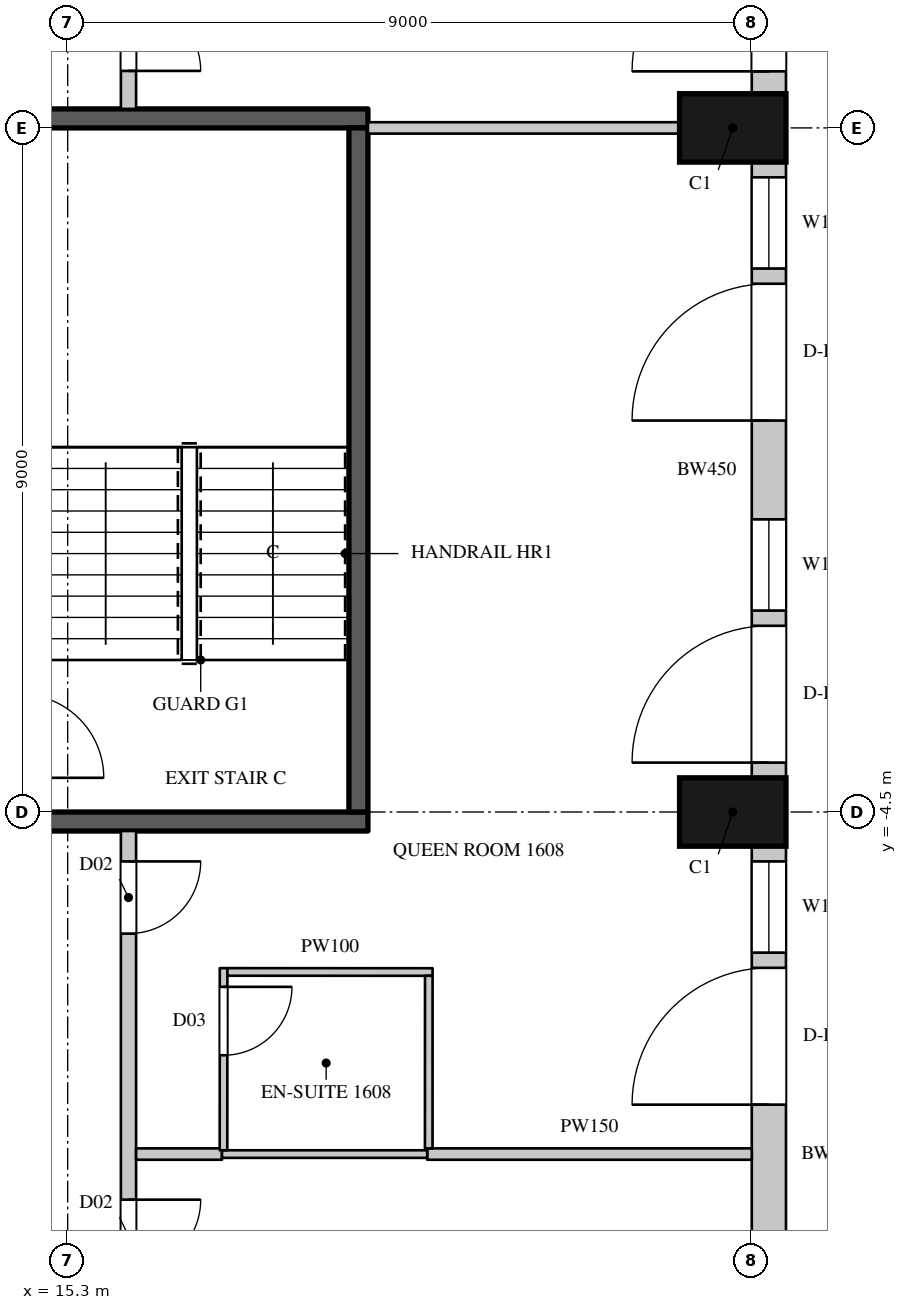
"""IFC4 building model, lengths in metres.
Left out: names, types, materials, properties, quantities, classifications, styles, units other than length and angle.
Written with IfcOpenShell. Run it as: python <this file> out.ifc"""

import sys

from ifc_helpers import new_model, si_unit, direction, frame, frame_2d, origin, origin_2d, place, context, subcontext, project, spatial, rectangle, extrude, element, fill, save


model = new_model("IFC4")
c1 = context("Model", 3, precision=1e-05, world=origin(), true_north=direction((0.0, 1.0)))
c2 = subcontext(c1, "Body", "Model", "MODEL_VIEW")
j1 = project(units=[si_unit("LENGTHUNIT", "METRE"), si_unit("PLANEANGLEUNIT", "RADIAN")], contexts=[c1])
p1 = place(None, origin())
s1 = spatial("IfcSite", under=j1, at=p1, CompositionType="ELEMENT")
p2 = place(p1, origin())
s2 = spatial("IfcBuilding", under=s1, at=p2, CompositionType="ELEMENT")
p3 = place(p2, frame((0.0, 0.0, 87.9)))
s3 = spatial("IfcBuildingStorey", under=s2, at=p3, CompositionType="ELEMENT", Elevation=87.9)
for number, where, z_axis, x_axis in (
    (1, (24.05, -4.5, 0.0), (0.0, 0.0, 1.0), (0.0, 1.0, 0.0)),
    (2, (24.05, 4.5, 0.0), (0.0, 0.0, 1.0), (0.0, 1.0, 0.0)),
):
    element("IfcColumn", number, at=place(p3, frame(where, z_axis=z_axis, x_axis=x_axis)), inside=s3, PredefinedType="COLUMN", context=c2, shape_type="SweptSolid", body=[
        extrude(rectangle(XDim=0.9, YDim=1.4, at=origin_2d()), origin(), (0.0, 0.0, 1.0), 3.6),
    ])
p4 = place(p3, frame((24.525, -13.05, 0.0), z_axis=(0.0, 0.0, 1.0), x_axis=(0.0, 1.0, 0.0)))
e3 = element("IfcWall", 3, at=p4, inside=s3, PredefinedType="SOLIDWALL", context=c2, shape_type="SweptSolid", body=[
    extrude(rectangle(XDim=8.1, YDim=0.45, at=frame_2d((4.05, 0.0))), origin(), (0.0, 0.0, 1.0), 3.3),
])
p5 = place(p4, frame((0.9, 0.0, 0.0)))
e4 = element("IfcOpeningElement", 4, at=p5, cuts=e3, PredefinedType="OPENING", context=c2, shape_type="SweptSolid", body=[
    extrude(rectangle(XDim=1.8, YDim=2.4, at=frame_2d((0.9, 1.2))), frame((0.0, 0.235, 0.0), z_axis=(0.0, -1.0, 0.0), x_axis=(1.0, 0.0, 0.0)), (0.0, 0.0, 1.0), 0.47),
])
p6 = place(p4, frame((4.7, 0.0, 0.0)))
e5 = element("IfcOpeningElement", 5, at=p6, cuts=e3, PredefinedType="OPENING", context=c2, shape_type="SweptSolid", body=[
    extrude(rectangle(XDim=1.8, YDim=2.4, at=frame_2d((0.9, 1.2))), frame((0.0, 0.235, 0.0), z_axis=(0.0, -1.0, 0.0), x_axis=(1.0, 0.0, 0.0)), (0.0, 0.0, 1.0), 0.47),
])
p7 = place(p4, frame((6.7, 0.0, 1.05)))
e6 = element("IfcOpeningElement", 6, at=p7, cuts=e3, PredefinedType="OPENING", context=c2, shape_type="SweptSolid", body=[
    extrude(rectangle(XDim=1.2, YDim=2.0, at=frame_2d((0.6, 1.0))), frame((0.0, 0.235, 0.0), z_axis=(0.0, -1.0, 0.0), x_axis=(1.0, 0.0, 0.0)), (0.0, 0.0, 1.0), 0.47),
])
p8 = place(p3, frame((24.525, -4.05, 0.0), z_axis=(0.0, 0.0, 1.0), x_axis=(0.0, 1.0, 0.0)))
e7 = element("IfcWall", 7, at=p8, inside=s3, PredefinedType="SOLIDWALL", context=c2, shape_type="SweptSolid", body=[
    extrude(rectangle(XDim=8.1, YDim=0.45, at=frame_2d((4.05, 0.0))), origin(), (0.0, 0.0, 1.0), 3.3),
])
p9 = place(p8, frame((0.2, 0.0, 0.0)))
e8 = element("IfcOpeningElement", 8, at=p9, cuts=e7, PredefinedType="OPENING", context=c2, shape_type="SweptSolid", body=[
    extrude(rectangle(XDim=1.8, YDim=2.4, at=frame_2d((0.9, 1.2))), frame((0.0, 0.235, 0.0), z_axis=(0.0, -1.0, 0.0), x_axis=(1.0, 0.0, 0.0)), (0.0, 0.0, 1.0), 0.47),
])
p10 = place(p8, frame((2.2, 0.0, 1.05)))
e9 = element("IfcOpeningElement", 9, at=p10, cuts=e7, PredefinedType="OPENING", context=c2, shape_type="SweptSolid", body=[
    extrude(rectangle(XDim=1.2, YDim=2.0, at=frame_2d((0.6, 1.0))), frame((0.0, 0.235, 0.0), z_axis=(0.0, -1.0, 0.0), x_axis=(1.0, 0.0, 0.0)), (0.0, 0.0, 1.0), 0.47),
])
p11 = place(p8, frame((4.7, 0.0, 0.0)))
e10 = element("IfcOpeningElement", 10, at=p11, cuts=e7, PredefinedType="OPENING", context=c2, shape_type="SweptSolid", body=[
    extrude(rectangle(XDim=1.8, YDim=2.4, at=frame_2d((0.9, 1.2))), frame((0.0, 0.235, 0.0), z_axis=(0.0, -1.0, 0.0), x_axis=(1.0, 0.0, 0.0)), (0.0, 0.0, 1.0), 0.47),
])
p12 = place(p8, frame((6.7, 0.0, 1.05)))
e11 = element("IfcOpeningElement", 11, at=p12, cuts=e7, PredefinedType="OPENING", context=c2, shape_type="SweptSolid", body=[
    extrude(rectangle(XDim=1.2, YDim=2.0, at=frame_2d((0.6, 1.0))), frame((0.0, 0.235, 0.0), z_axis=(0.0, -1.0, 0.0), x_axis=(1.0, 0.0, 0.0)), (0.0, 0.0, 1.0), 0.47),
])
p13 = place(p3, frame((24.525, 4.95, 0.0), z_axis=(0.0, 0.0, 1.0), x_axis=(0.0, 1.0, 0.0)))
e12 = element("IfcWall", 12, at=p13, inside=s3, PredefinedType="SOLIDWALL", context=c2, shape_type="SweptSolid", body=[
    extrude(rectangle(XDim=8.439, YDim=0.45, at=frame_2d((4.219, 0.0))), origin(), (0.0, 0.0, 1.0), 3.3),
])
p14 = place(p13, frame((0.294, 0.0, 0.0)))
e13 = element("IfcOpeningElement", 13, at=p14, cuts=e12, PredefinedType="OPENING", context=c2, shape_type="SweptSolid", body=[
    extrude(rectangle(XDim=1.8, YDim=2.4, at=frame_2d((0.9, 1.2))), frame((0.0, 0.235, 0.0), z_axis=(0.0, -1.0, 0.0), x_axis=(1.0, 0.0, 0.0)), (0.0, 0.0, 1.0), 0.47),
])
p15 = place(p13, frame((2.294, 0.0, 1.05)))
e14 = element("IfcOpeningElement", 14, at=p15, cuts=e12, PredefinedType="OPENING", context=c2, shape_type="SweptSolid", body=[
    extrude(rectangle(XDim=1.2, YDim=2.0, at=frame_2d((0.6, 1.0))), frame((0.0, 0.235, 0.0), z_axis=(0.0, -1.0, 0.0), x_axis=(1.0, 0.0, 0.0)), (0.0, 0.0, 1.0), 0.47),
])
p16 = place(p13, frame((5.232, 0.0, 1.05)))
e15 = element("IfcOpeningElement", 15, at=p16, cuts=e12, PredefinedType="OPENING", context=c2, shape_type="SweptSolid", body=[
    extrude(rectangle(XDim=2.7, YDim=2.0, at=frame_2d((1.35, 1.0))), frame((0.0, 0.235, 0.0), z_axis=(0.0, -1.0, 0.0), x_axis=(1.0, 0.0, 0.0)), (0.0, 0.0, 1.0), 0.47),
])
p17 = place(p3, frame((16.1, -17.5, 0.0), z_axis=(0.0, 0.0, 1.0), x_axis=(0.0, 1.0, 0.0)))
e16 = element("IfcWall", 16, at=p17, inside=s3, PredefinedType="PARTITIONING", context=c2, shape_type="SweptSolid", body=[
    extrude(rectangle(XDim=12.75, YDim=0.2, at=frame_2d((6.375, 0.0))), origin(), (0.0, 0.0, 1.0), 3.3),
])
p18 = place(p17, frame((2.75, 0.0, 0.0)))
e17 = element("IfcOpeningElement", 17, at=p18, cuts=e16, PredefinedType="OPENING", context=c2, shape_type="SweptSolid", body=[
    extrude(rectangle(XDim=0.95, YDim=2.2, at=frame_2d((0.475, 1.1))), frame((0.0, 0.11, 0.0), z_axis=(0.0, -1.0, 0.0), x_axis=(1.0, 0.0, 0.0)), (0.0, 0.0, 1.0), 0.22),
])
p19 = place(p17, frame((6.95, 0.0, 0.0)))
e18 = element("IfcOpeningElement", 18, at=p19, cuts=e16, PredefinedType="OPENING", context=c2, shape_type="SweptSolid", body=[
    extrude(rectangle(XDim=0.95, YDim=2.2, at=frame_2d((0.475, 1.1))), frame((0.0, 0.11, 0.0), z_axis=(0.0, -1.0, 0.0), x_axis=(1.0, 0.0, 0.0)), (0.0, 0.0, 1.0), 0.22),
])
p20 = place(p17, frame((11.4, 0.0, 0.0)))
e19 = element("IfcOpeningElement", 19, at=p20, cuts=e16, PredefinedType="OPENING", context=c2, shape_type="SweptSolid", body=[
    extrude(rectangle(XDim=0.95, YDim=2.2, at=frame_2d((0.475, 1.1))), frame((0.0, 0.11, 0.0), z_axis=(0.0, -1.0, 0.0), x_axis=(1.0, 0.0, 0.0)), (0.0, 0.0, 1.0), 0.22),
])
p21 = place(p3, frame((16.1, 4.75, 0.0), z_axis=(0.0, 0.0, 1.0), x_axis=(0.0, 1.0, 0.0)))
e20 = element("IfcWall", 20, at=p21, inside=s3, PredefinedType="PARTITIONING", context=c2, shape_type="SweptSolid", body=[
    extrude(rectangle(XDim=12.65, YDim=0.2, at=frame_2d((6.325, 0.0))), origin(), (0.0, 0.0, 1.0), 3.3),
])
p22 = place(p21, frame((0.5, 0.0, 0.0)))
e21 = element("IfcOpeningElement", 21, at=p22, cuts=e20, PredefinedType="OPENING", context=c2, shape_type="SweptSolid", body=[
    extrude(rectangle(XDim=0.95, YDim=2.2, at=frame_2d((0.475, 1.1))), frame((0.0, 0.11, 0.0), z_axis=(0.0, -1.0, 0.0), x_axis=(1.0, 0.0, 0.0)), (0.0, 0.0, 1.0), 0.22),
])
p23 = place(p21, frame((6.9, 0.0, 0.0)))
e22 = element("IfcOpeningElement", 22, at=p23, cuts=e20, PredefinedType="OPENING", context=c2, shape_type="SweptSolid", body=[
    extrude(rectangle(XDim=0.95, YDim=2.2, at=frame_2d((0.475, 1.1))), frame((0.0, 0.11, 0.0), z_axis=(0.0, -1.0, 0.0), x_axis=(1.0, 0.0, 0.0)), (0.0, 0.0, 1.0), 0.22),
])
p24 = place(p3, frame((16.2, -9.0, 0.0), z_axis=(0.0, 0.0, 1.0), x_axis=(1.0, 0.0, 0.0)))
e23 = element("IfcWall", 23, at=p24, inside=s3, PredefinedType="PARTITIONING", context=c2, shape_type="SweptSolid", body=[
    extrude(rectangle(XDim=1.13, YDim=0.15, at=frame_2d((0.565, 0.0))), origin(), (0.0, 0.0, 1.0), 2.65),
])
p25 = place(p3, frame((19.25, 4.5, 0.0), z_axis=(0.0, 0.0, 1.0), x_axis=(1.0, 0.0, 0.0)))
e24 = element("IfcWall", 24, at=p25, inside=s3, PredefinedType="PARTITIONING", context=c2, shape_type="SweptSolid", body=[
    extrude(rectangle(XDim=4.1, YDim=0.15, at=frame_2d((2.05, 0.0))), origin(), (0.0, 0.0, 1.0), 3.3),
])
p26 = place(p3, frame((20.03, -9.0, 0.0), z_axis=(0.0, 0.0, 1.0), x_axis=(1.0, 0.0, 0.0)))
e25 = element("IfcWall", 25, at=p26, inside=s3, PredefinedType="PARTITIONING", context=c2, shape_type="SweptSolid", body=[
    extrude(rectangle(XDim=4.27, YDim=0.15, at=frame_2d((2.135, 0.0))), origin(), (0.0, 0.0, 1.0), 2.65),
])
for number, where, z_axis, x_axis in (
    (26, (14.55, -4.625, 0.0), (0.0, 0.0, 1.0), (1.0, 0.0, 0.0)),
    (27, (14.55, 4.625, 0.0), (0.0, 0.0, 1.0), (1.0, 0.0, 0.0)),
):
    element("IfcWall", number, at=place(p3, frame(where, z_axis=z_axis, x_axis=x_axis)), inside=s3, PredefinedType="SHEAR", context=c2, shape_type="SweptSolid", body=[
        extrude(rectangle(XDim=4.7, YDim=0.25, at=frame_2d((2.35, 0.0))), origin(), (0.0, 0.0, 1.0), 3.3),
    ])
p27 = place(p3, frame((19.125, -4.5, 0.0), z_axis=(0.0, 0.0, 1.0), x_axis=(0.0, 1.0, 0.0)))
e28 = element("IfcWall", 28, at=p27, inside=s3, PredefinedType="SHEAR", context=c2, shape_type="SweptSolid", body=[
    extrude(rectangle(XDim=9.0, YDim=0.25, at=frame_2d((4.5, 0.0))), origin(), (0.0, 0.0, 1.0), 3.3),
])
p28 = place(p3, frame((17.33, -9.0, 0.0), z_axis=(0.0, 0.0, 1.0), x_axis=(1.0, 0.0, 0.0)))
e29 = element("IfcWall", 29, at=p28, inside=s3, PredefinedType="PARTITIONING", context=c2, shape_type="SweptSolid", body=[
    extrude(rectangle(XDim=2.7, YDim=0.1, at=frame_2d((1.35, 0.0))), origin(), (0.0, 0.0, 1.0), 2.65),
])
p29 = place(p3, frame((17.35, -8.95, 0.0), z_axis=(0.0, 0.0, 1.0), x_axis=(0.000407580973, 0.999999916939, 0.0)))
e30 = element("IfcWall", 30, at=p29, inside=s3, PredefinedType="PARTITIONING", context=c2, shape_type="SweptSolid", body=[
    extrude(rectangle(XDim=2.396, YDim=0.1, at=frame_2d((1.198, 0.0))), origin(), (0.0, 0.0, 1.0), 3.3),
])
p30 = place(p29, frame((1.25, 0.0, 0.0)))
e31 = element("IfcOpeningElement", 31, at=p30, cuts=e30, PredefinedType="OPENING", context=c2, shape_type="SweptSolid", body=[
    extrude(rectangle(XDim=0.9, YDim=2.2, at=frame_2d((0.45, 1.1))), frame((0.0, 0.06, 0.0), z_axis=(0.0, -1.0, 0.0), x_axis=(1.0, 0.0, 0.0)), (0.0, 0.0, 1.0), 0.12),
])
p31 = place(p3, frame((17.401, -6.604, 0.0), z_axis=(0.0, 0.0, 1.0), x_axis=(0.9999999346, -0.000361663629, 0.0)))
e32 = element("IfcWall", 32, at=p31, inside=s3, PredefinedType="PARTITIONING", context=c2, shape_type="SweptSolid", body=[
    extrude(rectangle(XDim=2.7, YDim=0.1, at=frame_2d((1.35, 0.0))), origin(), (0.0, 0.0, 1.0), 3.3),
])
p32 = place(p3, frame((20.05, -8.925, 0.0), z_axis=(0.0, 0.0, 1.0), x_axis=(0.000430200003, 0.999999907464, 0.0)))
e33 = element("IfcWall", 33, at=p32, inside=s3, PredefinedType="PARTITIONING", context=c2, shape_type="SweptSolid", body=[
    extrude(rectangle(XDim=2.27, YDim=0.1, at=frame_2d((1.135, 0.0))), origin(), (0.0, 0.0, 1.0), 3.3),
])
p33 = place(p6, origin())
e34 = element("IfcDoor", 34, at=p33, inside=s3, OperationType="SLIDING_TO_LEFT", PredefinedType="DOOR", context=c2, shape_type="SweptSolid", body=[
    extrude(rectangle(XDim=1.8, YDim=2.4, at=frame_2d((0.9, 1.2))), frame((0.0, 0.13, 0.0), z_axis=(0.0, -1.0, 0.0), x_axis=(1.0, 0.0, 0.0)), (0.0, 0.0, 1.0), 0.05),
])
fill(e5, e34)
p34 = place(p7, origin())
e35 = element("IfcWindow", 35, at=p34, inside=s3, PartitioningType="SINGLE_PANEL", PredefinedType="WINDOW", context=c2, shape_type="SweptSolid", body=[
    extrude(rectangle(XDim=1.2, YDim=2.0, at=frame_2d((0.6, 1.0))), frame((0.0, 0.135, 0.0), z_axis=(0.0, -1.0, 0.0), x_axis=(1.0, 0.0, 0.0)), (0.0, 0.0, 1.0), 0.06),
])
fill(e6, e35)
p35 = place(p9, origin())
e36 = element("IfcDoor", 36, at=p35, inside=s3, OperationType="SLIDING_TO_LEFT", PredefinedType="DOOR", context=c2, shape_type="SweptSolid", body=[
    extrude(rectangle(XDim=1.8, YDim=2.4, at=frame_2d((0.9, 1.2))), frame((0.0, 0.13, 0.0), z_axis=(0.0, -1.0, 0.0), x_axis=(1.0, 0.0, 0.0)), (0.0, 0.0, 1.0), 0.05),
])
fill(e8, e36)
p36 = place(p10, origin())
e37 = element("IfcWindow", 37, at=p36, inside=s3, PartitioningType="SINGLE_PANEL", PredefinedType="WINDOW", context=c2, shape_type="SweptSolid", body=[
    extrude(rectangle(XDim=1.2, YDim=2.0, at=frame_2d((0.6, 1.0))), frame((0.0, 0.135, 0.0), z_axis=(0.0, -1.0, 0.0), x_axis=(1.0, 0.0, 0.0)), (0.0, 0.0, 1.0), 0.06),
])
fill(e9, e37)
p37 = place(p11, origin())
e38 = element("IfcDoor", 38, at=p37, inside=s3, OperationType="SLIDING_TO_LEFT", PredefinedType="DOOR", context=c2, shape_type="SweptSolid", body=[
    extrude(rectangle(XDim=1.8, YDim=2.4, at=frame_2d((0.9, 1.2))), frame((0.0, 0.13, 0.0), z_axis=(0.0, -1.0, 0.0), x_axis=(1.0, 0.0, 0.0)), (0.0, 0.0, 1.0), 0.05),
])
fill(e10, e38)
p38 = place(p12, origin())
e39 = element("IfcWindow", 39, at=p38, inside=s3, PartitioningType="SINGLE_PANEL", PredefinedType="WINDOW", context=c2, shape_type="SweptSolid", body=[
    extrude(rectangle(XDim=1.2, YDim=2.0, at=frame_2d((0.6, 1.0))), frame((0.0, 0.135, 0.0), z_axis=(0.0, -1.0, 0.0), x_axis=(1.0, 0.0, 0.0)), (0.0, 0.0, 1.0), 0.06),
])
fill(e11, e39)
p39 = place(p14, origin())
e40 = element("IfcDoor", 40, at=p39, inside=s3, OperationType="SLIDING_TO_LEFT", PredefinedType="DOOR", context=c2, shape_type="SweptSolid", body=[
    extrude(rectangle(XDim=1.8, YDim=2.4, at=frame_2d((0.9, 1.2))), frame((0.0, 0.13, 0.0), z_axis=(0.0, -1.0, 0.0), x_axis=(1.0, 0.0, 0.0)), (0.0, 0.0, 1.0), 0.05),
])
fill(e13, e40)
p40 = place(p19, origin())
e41 = element("IfcDoor", 41, at=p40, inside=s3, OperationType="SINGLE_SWING_LEFT", PredefinedType="DOOR", context=c2, shape_type="SweptSolid", body=[
    extrude(rectangle(XDim=0.95, YDim=2.2, at=frame_2d((0.475, 1.1))), frame((0.0, 0.025, 0.0), z_axis=(0.0, -1.0, 0.0), x_axis=(1.0, 0.0, 0.0)), (0.0, 0.0, 1.0), 0.05),
])
fill(e18, e41)
p41 = place(p20, origin())
e42 = element("IfcDoor", 42, at=p41, inside=s3, OperationType="SINGLE_SWING_LEFT", PredefinedType="DOOR", context=c2, shape_type="SweptSolid", body=[
    extrude(rectangle(XDim=0.95, YDim=2.2, at=frame_2d((0.475, 1.1))), frame((0.0, 0.025, 0.0), z_axis=(0.0, -1.0, 0.0), x_axis=(1.0, 0.0, 0.0)), (0.0, 0.0, 1.0), 0.05),
])
fill(e19, e42)
p42 = place(p30, origin())
e43 = element("IfcDoor", 43, at=p42, inside=s3, OperationType="SINGLE_SWING_LEFT", PredefinedType="DOOR", context=c2, shape_type="SweptSolid", body=[
    extrude(rectangle(XDim=0.9, YDim=2.2, at=frame_2d((0.45, 1.1))), frame((0.0, 0.025, 0.0), z_axis=(0.0, -1.0, 0.0), x_axis=(1.0, 0.0, 0.0)), (0.0, 0.0, 1.0), 0.05),
])
fill(e31, e43)
p43 = place(p22, origin())
e44 = element("IfcDoor", 44, at=p43, inside=s3, OperationType="SINGLE_SWING_RIGHT", PredefinedType="DOOR", context=c2, shape_type="SweptSolid", body=[
    extrude(rectangle(XDim=0.95, YDim=2.2, at=frame_2d((0.475, 1.1))), frame((0.0, 0.025, 0.0), z_axis=(0.0, -1.0, 0.0), x_axis=(1.0, 0.0, 0.0)), (0.0, 0.0, 1.0), 0.05),
])
fill(e21, e44)
save(model, sys.argv[1])
